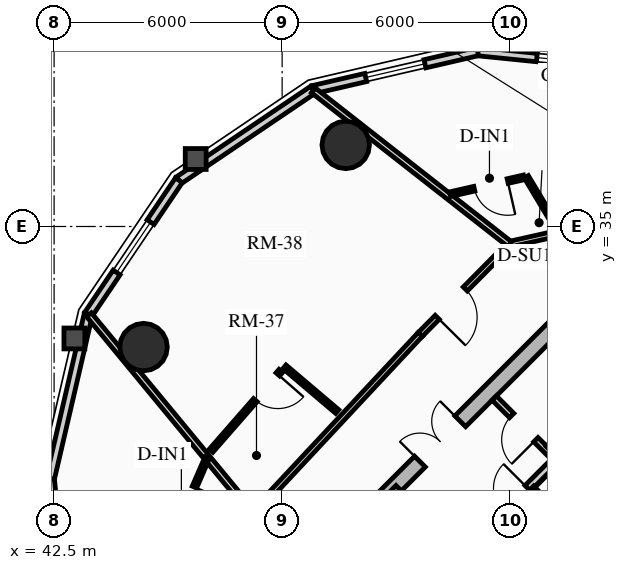
"""IFC4 building model, lengths in metres.
Left out: names, types, materials, properties, quantities, classifications, styles, units other than length and angle.
Written with IfcOpenShell. Run it as: python <this file> out.ifc"""

import sys

from ifc_helpers import new_model, si_unit, direction, frame, frame_2d, origin, origin_2d, place, context, subcontext, project, spatial, rectangle, circle, extrude, source, transform, mapped, element, fill, save


model = new_model("IFC4")
c1 = context("Model", 3, precision=1e-05, world=origin(), true_north=direction((0.0, 1.0)))
c2 = subcontext(c1, "Body", "Model", "MODEL_VIEW")
j1 = project(units=[si_unit("LENGTHUNIT", "METRE"), si_unit("PLANEANGLEUNIT", "RADIAN")], contexts=[c1])
p1 = place(None, origin())
s1 = spatial("IfcSite", under=j1, at=p1, CompositionType="ELEMENT")
p2 = place(p1, origin())
s2 = spatial("IfcBuilding", under=s1, at=p2, CompositionType="ELEMENT")
p3 = place(p2, frame((0.0, 0.0, 183.61)))
s3 = spatial("IfcBuildingStorey", under=s2, at=p3, CompositionType="ELEMENT", Elevation=183.61)
p4 = place(p3, frame((48.873, 25.561, 0.0), z_axis=(0.0, 0.0, 1.0), x_axis=(0.707106781187, 0.707106781187, 0.0)))
e1 = element("IfcWall", 1, at=p4, inside=s3, PredefinedType="SHEAR", context=c2, shape_type="SweptSolid", body=[
    extrude(rectangle(XDim=10.7, YDim=0.4, at=frame_2d((5.35, 0.0))), origin(), (0.0, 0.0, 1.0), 2.91),
])
m1 = source(origin(), c2, "Body", "SweptSolid", [
    extrude(rectangle(XDim=1.5, YDim=2.02, at=frame_2d((0.75, 1.01))), frame((0.0, 0.21, 0.0), z_axis=(0.0, -1.0, 0.0), x_axis=(1.0, 0.0, 0.0)), (0.0, 0.0, 1.0), 0.42),
])
p5 = place(p4, frame((4.6, 0.0, 0.0)))
e2 = element("IfcOpeningElement", 2, at=p5, cuts=e1, PredefinedType="OPENING", context=c2, shape_type="MappedRepresentation", body=[
    mapped(m1, transform((0.0, 0.0, 0.0), x_axis=(1.0, 0.0, 0.0), y_axis=(0.0, 1.0, 0.0), z_axis=(0.0, 0.0, 1.0), scale=1.0)),
])
p6 = place(p3, frame((61.06, 18.373, 0.0), z_axis=(0.0, 0.0, 1.0), x_axis=(-0.707106781187, 0.707106781187, 0.0)))
e3 = element("IfcWall", 3, at=p6, inside=s3, PredefinedType="SHEAR", context=c2, shape_type="SweptSolid", body=[
    extrude(rectangle(XDim=13.7, YDim=0.35, at=frame_2d((6.85, 0.0))), origin(), (0.0, 0.0, 1.0), 2.91),
])
m2 = source(origin(), c2, "Body", "SweptSolid", [
    extrude(rectangle(XDim=1.1, YDim=2.015, at=frame_2d((0.55, 1.007))), frame((0.0, 0.185, 0.0), z_axis=(0.0, -1.0, 0.0), x_axis=(1.0, 0.0, 0.0)), (0.0, 0.0, 1.0), 0.37),
])
p7 = place(p6, frame((4.85, 0.0, 0.0)))
e4 = element("IfcOpeningElement", 4, at=p7, cuts=e3, PredefinedType="OPENING", context=c2, shape_type="MappedRepresentation", body=[
    mapped(m2, transform((0.0, 0.0, 0.0), x_axis=(1.0, 0.0, 0.0), y_axis=(0.0, 1.0, 0.0), z_axis=(0.0, 0.0, 1.0), scale=1.0)),
])
p8 = place(p6, frame((0.625, 0.0, 0.0)))
e5 = element("IfcOpeningElement", 5, at=p8, cuts=e3, PredefinedType="OPENING", context=c2, shape_type="MappedRepresentation", body=[
    mapped(m2, transform((0.0, 0.0, 0.0), x_axis=(1.0, 0.0, 0.0), y_axis=(0.0, 1.0, 0.0), z_axis=(0.0, 0.0, 1.0), scale=1.0)),
])
p9 = place(p6, frame((2.625, 0.0, 0.0)))
e6 = element("IfcOpeningElement", 6, at=p9, cuts=e3, PredefinedType="OPENING", context=c2, shape_type="MappedRepresentation", body=[
    mapped(m2, transform((0.0, 0.0, 0.0), x_axis=(1.0, 0.0, 0.0), y_axis=(0.0, 1.0, 0.0), z_axis=(0.0, 0.0, 1.0), scale=1.0)),
])
m3 = source(origin(), c2, "Body", "SweptSolid", [
    extrude(rectangle(XDim=1.15, YDim=2.02, at=frame_2d((0.575, 1.01))), frame((0.0, 0.185, 0.0), z_axis=(0.0, -1.0, 0.0), x_axis=(1.0, 0.0, 0.0)), (0.0, 0.0, 1.0), 0.37),
])
p10 = place(p6, frame((7.27, 0.0, 0.0)))
e7 = element("IfcOpeningElement", 7, at=p10, cuts=e3, PredefinedType="OPENING", context=c2, shape_type="MappedRepresentation", body=[
    mapped(m3, transform((0.0, 0.0, 0.0), x_axis=(1.0, 0.0, 0.0), y_axis=(0.0, 1.0, 0.0), z_axis=(0.0, 0.0, 1.0), scale=1.0)),
])
for number, where, z_axis, x_axis in (
    (8, (50.173, 37.146, 0.0), (0.0, 0.0, 1.0), (1.0, 0.0, 0.0)),
    (9, (44.854, 31.827, 0.0), (0.0, 0.0, 1.0), (1.0, 0.0, 0.0)),
):
    element("IfcColumn", number, at=place(p3, frame(where, z_axis=z_axis, x_axis=x_axis)), inside=s3, PredefinedType="USERDEFINED", context=c2, shape_type="SweptSolid", body=[
        extrude(circle(Radius=0.625, at=origin_2d()), origin(), (0.0, 0.0, 1.0), 2.91),
    ])
p11 = place(p3, frame((53.645, 39.603, 0.0), z_axis=(0.0, 0.0, 1.0), x_axis=(0.994943283129, -0.100438356004, 0.0)))
e10 = element("IfcWall", 10, at=p11, inside=s3, PredefinedType="SOLIDWALL", context=c2, shape_type="SweptSolid", body=[
    extrude(rectangle(XDim=4.733, YDim=0.22, at=frame_2d((2.366, 0.0))), origin(), (0.0, 0.0, 1.0), 2.245),
])
m4 = source(origin(), c2, "Body", "SweptSolid", [
    extrude(rectangle(XDim=1.6, YDim=1.3, at=frame_2d((0.8, 0.65))), frame((0.0, 0.12, 0.0), z_axis=(0.0, -1.0, 0.0), x_axis=(1.0, 0.0, 0.0)), (0.0, 0.0, 1.0), 0.24),
])
p12 = place(p11, frame((1.566, 0.0, 0.65)))
e11 = element("IfcOpeningElement", 11, at=p12, cuts=e10, PredefinedType="OPENING", context=c2, shape_type="MappedRepresentation", body=[
    mapped(m4, transform((0.0, 0.0, 0.0), x_axis=(1.0, 0.0, 0.0), y_axis=(0.0, 1.0, 0.0), z_axis=(0.0, 0.0, 1.0), scale=1.0)),
])
p13 = place(p3, frame((49.313, 38.6, 0.0), z_axis=(0.0, 0.0, 1.0), x_axis=(0.97422620202, 0.22557328587, 0.0)))
e12 = element("IfcWall", 12, at=p13, inside=s3, PredefinedType="SOLIDWALL", context=c2, shape_type="SweptSolid", body=[
    extrude(rectangle(XDim=4.446, YDim=0.22, at=frame_2d((2.223, 0.0))), origin(), (0.0, 0.0, 1.0), 2.245),
])
p14 = place(p13, frame((1.423, 0.0, 0.65)))
e13 = element("IfcOpeningElement", 13, at=p14, cuts=e12, PredefinedType="OPENING", context=c2, shape_type="MappedRepresentation", body=[
    mapped(m4, transform((0.0, 0.0, 0.0), x_axis=(1.0, 0.0, 0.0), y_axis=(0.0, 1.0, 0.0), z_axis=(0.0, 0.0, 1.0), scale=1.0)),
])
p15 = place(p3, frame((45.783, 36.217, 0.0), z_axis=(0.0, 0.0, 1.0), x_axis=(0.828817439852, 0.55951912514, 0.0)))
e14 = element("IfcWall", 14, at=p15, inside=s3, PredefinedType="SOLIDWALL", context=c2, shape_type="SweptSolid", body=[
    extrude(rectangle(XDim=4.259, YDim=0.22, at=frame_2d((2.129, 0.0))), origin(), (0.0, 0.0, 1.0), 2.245),
])
p16 = place(p3, frame((43.4, 32.687, 0.0), z_axis=(0.0, 0.0, 1.0), x_axis=(0.55951912514, 0.828817439852, 0.0)))
e15 = element("IfcWall", 15, at=p16, inside=s3, PredefinedType="SOLIDWALL", context=c2, shape_type="SweptSolid", body=[
    extrude(rectangle(XDim=4.259, YDim=0.22, at=frame_2d((2.129, 0.0))), origin(), (0.0, 0.0, 1.0), 2.245),
])
p17 = place(p16, frame((1.33, 0.0, 0.65)))
e16 = element("IfcOpeningElement", 16, at=p17, cuts=e15, PredefinedType="OPENING", context=c2, shape_type="MappedRepresentation", body=[
    mapped(m4, transform((0.0, 0.0, 0.0), x_axis=(1.0, 0.0, 0.0), y_axis=(0.0, 1.0, 0.0), z_axis=(0.0, 0.0, 1.0), scale=1.0)),
])
p18 = place(p3, frame((42.397, 28.355, 0.0), z_axis=(0.0, 0.0, 1.0), x_axis=(0.22557328587, 0.97422620202, 0.0)))
e17 = element("IfcWall", 17, at=p18, inside=s3, PredefinedType="SOLIDWALL", context=c2, shape_type="SweptSolid", body=[
    extrude(rectangle(XDim=4.446, YDim=0.22, at=frame_2d((2.223, 0.0))), origin(), (0.0, 0.0, 1.0), 2.245),
])
p19 = place(p3, frame((42.873, 23.646, 0.0), z_axis=(0.0, 0.0, 1.0), x_axis=(-0.100438356004, 0.994943283129, 0.0)))
e18 = element("IfcWall", 18, at=p19, inside=s3, PredefinedType="SOLIDWALL", context=c2, shape_type="SweptSolid", body=[
    extrude(rectangle(XDim=4.733, YDim=0.22, at=frame_2d((2.366, 0.0))), origin(), (0.0, 0.0, 1.0), 2.245),
])
p20 = place(p19, frame((1.566, 0.0, 0.65)))
e19 = element("IfcOpeningElement", 19, at=p20, cuts=e18, PredefinedType="OPENING", context=c2, shape_type="MappedRepresentation", body=[
    mapped(m4, transform((0.0, 0.0, 0.0), x_axis=(1.0, 0.0, 0.0), y_axis=(0.0, 1.0, 0.0), z_axis=(0.0, 0.0, 1.0), scale=1.0)),
])
p21 = place(p3, frame((53.264, 26.416, 0.0), z_axis=(0.0, 0.0, 1.0), x_axis=(0.707106781187, 0.707106781187, 0.0)))
e20 = element("IfcWall", 20, at=p21, inside=s3, PredefinedType="PARTITIONING", context=c2, shape_type="SweptSolid", body=[
    extrude(rectangle(XDim=3.28, YDim=0.2, at=frame_2d((1.64, 0.0))), origin(), (0.0, 0.0, 1.0), 2.675),
])
m5 = source(origin(), c2, "Body", "SweptSolid", [
    extrude(rectangle(XDim=1.0, YDim=2.015, at=frame_2d((0.5, 1.007))), frame((0.0, 0.11, 0.0), z_axis=(0.0, -1.0, 0.0), x_axis=(1.0, 0.0, 0.0)), (0.0, 0.0, 1.0), 0.22),
])
p22 = place(p21, frame((0.14, 0.0, 0.0)))
e21 = element("IfcOpeningElement", 21, at=p22, cuts=e20, PredefinedType="OPENING", context=c2, shape_type="MappedRepresentation", body=[
    mapped(m5, transform((0.0, 0.0, 0.0), x_axis=(1.0, 0.0, 0.0), y_axis=(0.0, 1.0, 0.0), z_axis=(0.0, 0.0, 1.0), scale=1.0)),
])
m6 = source(origin(), c2, "Body", "SweptSolid", [
    extrude(rectangle(XDim=0.9, YDim=2.005, at=frame_2d((0.45, 1.002))), frame((0.0, 0.11, 0.0), z_axis=(0.0, -1.0, 0.0), x_axis=(1.0, 0.0, 0.0)), (0.0, 0.0, 1.0), 0.22),
])
p23 = place(p21, frame((1.5, 0.0, 0.0)))
e22 = element("IfcOpeningElement", 22, at=p23, cuts=e20, PredefinedType="OPENING", context=c2, shape_type="MappedRepresentation", body=[
    mapped(m6, transform((0.0, 0.0, 0.0), x_axis=(1.0, 0.0, 0.0), y_axis=(0.0, 1.0, 0.0), z_axis=(0.0, 0.0, 1.0), scale=1.0)),
])
p24 = place(p3, frame((56.673, 26.529, 0.0), z_axis=(0.0, 0.0, 1.0), x_axis=(-0.707052764397, 0.70716079385, 0.0)))
e23 = element("IfcWall", 23, at=p24, inside=s3, PredefinedType="PARTITIONING", context=c2, shape_type="SweptSolid", body=[
    extrude(rectangle(XDim=2.26, YDim=0.125, at=frame_2d((1.13, 0.0))), origin(), (0.0, 0.0, 1.0), 2.675),
])
m7 = source(origin(), c2, "Body", "SweptSolid", [
    extrude(rectangle(XDim=0.9, YDim=2.005, at=frame_2d((0.45, 1.002))), frame((0.0, 0.073, 0.0), z_axis=(0.0, -1.0, 0.0), x_axis=(1.0, 0.0, 0.0)), (0.0, 0.0, 1.0), 0.145),
])
p25 = place(p24, frame((0.65, 0.0, 0.0)))
e24 = element("IfcOpeningElement", 24, at=p25, cuts=e23, PredefinedType="OPENING", context=c2, shape_type="MappedRepresentation", body=[
    mapped(m7, transform((0.0, 0.0, 0.0), x_axis=(1.0, 0.0, 0.0), y_axis=(0.0, 1.0, 0.0), z_axis=(0.0, 0.0, 1.0), scale=1.0)),
])
p26 = place(p3, frame((56.839, 27.728, 0.0), z_axis=(0.0, 0.0, 1.0), x_axis=(-0.707106781187, 0.707106781187, 0.0)))
e25 = element("IfcWall", 25, at=p26, inside=s3, PredefinedType="PARTITIONING", context=c2, shape_type="SweptSolid", body=[
    extrude(rectangle(XDim=3.9, YDim=0.16, at=frame_2d((1.95, 0.0))), origin(), (0.0, 0.0, 1.0), 2.675),
])
m8 = source(origin(), c2, "Body", "SweptSolid", [
    extrude(rectangle(XDim=0.9, YDim=2.005, at=frame_2d((0.45, 1.002))), frame((0.0, 0.09, 0.0), z_axis=(0.0, -1.0, 0.0), x_axis=(1.0, 0.0, 0.0)), (0.0, 0.0, 1.0), 0.18),
])
p27 = place(p26, frame((0.55, 0.0, 0.0)))
e26 = element("IfcOpeningElement", 26, at=p27, cuts=e25, PredefinedType="OPENING", context=c2, shape_type="MappedRepresentation", body=[
    mapped(m8, transform((0.0, 0.0, 0.0), x_axis=(1.0, 0.0, 0.0), y_axis=(0.0, 1.0, 0.0), z_axis=(0.0, 0.0, 1.0), scale=1.0)),
])
p28 = place(p26, frame((2.35, 0.0, 0.0)))
e27 = element("IfcOpeningElement", 27, at=p28, cuts=e25, PredefinedType="OPENING", context=c2, shape_type="MappedRepresentation", body=[
    mapped(m8, transform((0.0, 0.0, 0.0), x_axis=(1.0, 0.0, 0.0), y_axis=(0.0, 1.0, 0.0), z_axis=(0.0, 0.0, 1.0), scale=1.0)),
])
p29 = place(p3, frame((55.492, 29.167, 0.0), z_axis=(0.0, 0.0, 1.0), x_axis=(0.707144688645, 0.707068871696, 0.0)))
e28 = element("IfcWall", 28, at=p29, inside=s3, PredefinedType="PARTITIONING", context=c2, shape_type="SweptSolid", body=[
    extrude(rectangle(XDim=3.22, YDim=0.125, at=frame_2d((1.61, 0.0))), origin(), (0.0, 0.0, 1.0), 2.212),
])
p30 = place(p3, frame((56.025, 34.88, 0.0), z_axis=(0.0, 0.0, 1.0), x_axis=(-0.975729093394, -0.218981132301, 0.0)))
e29 = element("IfcWall", 29, at=p30, inside=s3, PredefinedType="PARTITIONING", context=c2, shape_type="SweptSolid", body=[
    extrude(rectangle(XDim=1.575, YDim=0.15, at=frame_2d((0.788, 0.0))), origin(), (0.0, 0.0, 1.0), 2.245),
])
p31 = place(p3, frame((54.488, 34.535, 0.0), z_axis=(0.0, 0.0, 1.0), x_axis=(-0.703666289339, -0.710530613871, 0.0)))
e30 = element("IfcWall", 30, at=p31, inside=s3, PredefinedType="PARTITIONING", context=c2, shape_type="SweptSolid", body=[
    extrude(rectangle(XDim=3.343, YDim=0.15, at=frame_2d((1.672, 0.0))), origin(), (0.0, 0.0, 1.0), 2.245),
])
m9 = source(origin(), c2, "Body", "SweptSolid", [
    extrude(rectangle(XDim=1.05, YDim=2.015, at=frame_2d((0.525, 1.007))), frame((0.0, 0.085, 0.0), z_axis=(0.0, -1.0, 0.0), x_axis=(1.0, 0.0, 0.0)), (0.0, 0.0, 1.0), 0.17),
])
p32 = place(p31, frame((1.66, 0.0, 0.0)))
e31 = element("IfcOpeningElement", 31, at=p32, cuts=e30, PredefinedType="OPENING", context=c2, shape_type="MappedRepresentation", body=[
    mapped(m9, transform((0.0, 0.0, 0.0), x_axis=(1.0, 0.0, 0.0), y_axis=(0.0, 1.0, 0.0), z_axis=(0.0, 0.0, 1.0), scale=1.0)),
])
p33 = place(p3, frame((52.135, 32.159, 0.0), z_axis=(0.0, 0.0, 1.0), x_axis=(-0.682546302454, -0.730842353047, 0.0)))
e32 = element("IfcWall", 32, at=p33, inside=s3, PredefinedType="PARTITIONING", context=c2, shape_type="SweptSolid", body=[
    extrude(rectangle(XDim=6.445, YDim=0.15, at=frame_2d((3.223, 0.0))), origin(), (0.0, 0.0, 1.0), 2.245),
])
p34 = place(p3, frame((54.488, 34.535, 0.0), z_axis=(0.0, 0.0, 1.0), x_axis=(-0.787155500995, 0.616754584298, 0.0)))
e33 = element("IfcWall", 33, at=p34, inside=s3, PredefinedType="PARTITIONING", context=c2, shape_type="SweptSolid", body=[
    extrude(rectangle(XDim=6.562, YDim=0.16, at=frame_2d((3.281, 0.0))), origin(), (0.0, 0.0, 1.0), 2.245),
])
p35 = place(p3, frame((47.736, 27.449, 0.0), z_axis=(0.0, 0.0, 1.0), x_axis=(-0.636785609289, 0.771040911886, 0.0)))
e34 = element("IfcWall", 34, at=p35, inside=s3, PredefinedType="PARTITIONING", context=c2, shape_type="SweptSolid", body=[
    extrude(rectangle(XDim=6.781, YDim=0.16, at=frame_2d((3.391, 0.0))), origin(), (0.0, 0.0, 1.0), 2.245),
])
p36 = place(p3, frame((55.727, 34.97, 0.0), z_axis=(0.0, 0.0, 1.0), x_axis=(-0.514518774568, 0.857479113808, 0.0)))
e35 = element("IfcWall", 35, at=p36, inside=s3, PredefinedType="PARTITIONING", context=c2, shape_type="SweptSolid", body=[
    extrude(rectangle(XDim=1.56, YDim=0.125, at=frame_2d((0.78, 0.0))), origin(), (0.0, 0.0, 1.0), 2.245),
])
p37 = place(p3, frame((54.864, 36.293, 0.0), z_axis=(0.0, 0.0, 1.0), x_axis=(-0.974875983782, -0.222748324896, 0.0)))
e36 = element("IfcWall", 36, at=p37, inside=s3, PredefinedType="PARTITIONING", context=c2, shape_type="SweptSolid", body=[
    extrude(rectangle(XDim=1.994, YDim=0.125, at=frame_2d((0.997, 0.0))), origin(), (0.0, 0.0, 1.0), 2.675),
])
p38 = place(p37, frame((0.44, 0.0, 0.0)))
e37 = element("IfcOpeningElement", 37, at=p38, cuts=e36, PredefinedType="OPENING", context=c2, shape_type="MappedRepresentation", body=[
    mapped(m7, transform((0.0, 0.0, 0.0), x_axis=(1.0, 0.0, 0.0), y_axis=(0.0, 1.0, 0.0), z_axis=(0.0, 0.0, 1.0), scale=1.0)),
])
p39 = place(p3, frame((49.949, 30.13, 0.0), z_axis=(0.0, 0.0, 1.0), x_axis=(-0.76253118385, 0.646951461592, 0.0)))
e38 = element("IfcWall", 38, at=p39, inside=s3, PredefinedType="PARTITIONING", context=c2, shape_type="SweptSolid", body=[
    extrude(rectangle(XDim=1.821, YDim=0.125, at=frame_2d((0.91, 0.0))), origin(), (0.0, 0.0, 1.0), 2.675),
])
p40 = place(p3, frame((48.465, 31.199, 0.0), z_axis=(0.0, 0.0, 1.0), x_axis=(-0.658113718436, -0.752918543805, 0.0)))
e39 = element("IfcWall", 39, at=p40, inside=s3, PredefinedType="PARTITIONING", context=c2, shape_type="SweptSolid", body=[
    extrude(rectangle(XDim=2.786, YDim=0.125, at=frame_2d((1.393, 0.0))), origin(), (0.0, 0.0, 1.0), 2.245),
])
p41 = place(p40, frame((0.12, 0.0, 0.0)))
e40 = element("IfcOpeningElement", 40, at=p41, cuts=e39, PredefinedType="OPENING", context=c2, shape_type="MappedRepresentation", body=[
    mapped(m7, transform((0.0, 0.0, 0.0), x_axis=(1.0, 0.0, 0.0), y_axis=(0.0, 1.0, 0.0), z_axis=(0.0, 0.0, 1.0), scale=1.0)),
])
p42 = place(p3, frame((46.527, 28.913, 0.0), z_axis=(0.0, 0.0, 1.0), x_axis=(-0.398002989165, -0.917384118358, 0.0)))
e41 = element("IfcWall", 41, at=p42, inside=s3, PredefinedType="PARTITIONING", context=c2, shape_type="SweptSolid", body=[
    extrude(rectangle(XDim=2.581, YDim=0.125, at=frame_2d((1.29, 0.0))), origin(), (0.0, 0.0, 1.0), 2.245),
])
p43 = place(p42, frame((0.84, 0.0, 0.0)))
e42 = element("IfcOpeningElement", 42, at=p43, cuts=e41, PredefinedType="OPENING", context=c2, shape_type="MappedRepresentation", body=[
    mapped(m7, transform((0.0, 0.0, 0.0), x_axis=(1.0, 0.0, 0.0), y_axis=(0.0, 1.0, 0.0), z_axis=(0.0, 0.0, 1.0), scale=1.0)),
])
m10 = source(origin(), c2, "Body", "SweptSolid", [
    extrude(rectangle(XDim=1.6, YDim=1.3, at=frame_2d((0.8, 0.65))), frame((0.0, 0.03, 0.0), z_axis=(0.0, -1.0, 0.0), x_axis=(1.0, 0.0, 0.0)), (0.0, 0.0, 1.0), 0.06),
])
p44 = place(p12, origin())
e43 = element("IfcWindow", 43, at=p44, inside=s3, PartitioningType="SINGLE_PANEL", PredefinedType="WINDOW", context=c2, shape_type="MappedRepresentation", body=[
    mapped(m10, transform((0.0, 0.0, 0.0), x_axis=(1.0, 0.0, 0.0), y_axis=(0.0, 1.0, 0.0), z_axis=(0.0, 0.0, 1.0), scale=1.0)),
])
fill(e11, e43)
p45 = place(p14, origin())
e44 = element("IfcWindow", 44, at=p45, inside=s3, PartitioningType="SINGLE_PANEL", PredefinedType="WINDOW", context=c2, shape_type="MappedRepresentation", body=[
    mapped(m10, transform((0.0, 0.0, 0.0), x_axis=(1.0, 0.0, 0.0), y_axis=(0.0, 1.0, 0.0), z_axis=(0.0, 0.0, 1.0), scale=1.0)),
])
fill(e13, e44)
p46 = place(p17, origin())
e45 = element("IfcWindow", 45, at=p46, inside=s3, PartitioningType="SINGLE_PANEL", PredefinedType="WINDOW", context=c2, shape_type="MappedRepresentation", body=[
    mapped(m10, transform((0.0, 0.0, 0.0), x_axis=(1.0, 0.0, 0.0), y_axis=(0.0, 1.0, 0.0), z_axis=(0.0, 0.0, 1.0), scale=1.0)),
])
fill(e16, e45)
m11 = source(origin(), c2, "Body", "SweptSolid", [
    extrude(rectangle(XDim=1.5, YDim=2.02, at=frame_2d((0.75, 1.01))), frame((0.0, 0.025, 0.0), z_axis=(0.0, -1.0, 0.0), x_axis=(1.0, 0.0, 0.0)), (0.0, 0.0, 1.0), 0.05),
])
p47 = place(p5, origin())
e46 = element("IfcDoor", 46, at=p47, inside=s3, OperationType="DOUBLE_DOOR_SINGLE_SWING", PredefinedType="DOOR", context=c2, shape_type="MappedRepresentation", body=[
    mapped(m11, transform((0.0, 0.0, 0.0), x_axis=(1.0, 0.0, 0.0), y_axis=(0.0, 1.0, 0.0), z_axis=(0.0, 0.0, 1.0), scale=1.0)),
])
fill(e2, e46)
m12 = source(origin(), c2, "Body", "SweptSolid", [
    extrude(rectangle(XDim=0.9, YDim=2.005, at=frame_2d((0.45, 1.002))), frame((0.0, 0.025, 0.0), z_axis=(0.0, -1.0, 0.0), x_axis=(1.0, 0.0, 0.0)), (0.0, 0.0, 1.0), 0.05),
])
p48 = place(p23, origin())
e47 = element("IfcDoor", 47, at=p48, inside=s3, OperationType="SINGLE_SWING_RIGHT", PredefinedType="DOOR", context=c2, shape_type="MappedRepresentation", body=[
    mapped(m12, transform((0.0, 0.0, 0.0), x_axis=(1.0, 0.0, 0.0), y_axis=(0.0, 1.0, 0.0), z_axis=(0.0, 0.0, 1.0), scale=1.0)),
])
fill(e22, e47)
p49 = place(p28, origin())
e48 = element("IfcDoor", 48, at=p49, inside=s3, OperationType="SINGLE_SWING_LEFT", PredefinedType="DOOR", context=c2, shape_type="MappedRepresentation", body=[
    mapped(m12, transform((0.0, 0.0, 0.0), x_axis=(1.0, 0.0, 0.0), y_axis=(0.0, 1.0, 0.0), z_axis=(0.0, 0.0, 1.0), scale=1.0)),
])
fill(e27, e48)
p50 = place(p38, origin())
e49 = element("IfcDoor", 49, at=p50, inside=s3, OperationType="SINGLE_SWING_LEFT", PredefinedType="DOOR", context=c2, shape_type="MappedRepresentation", body=[
    mapped(m12, transform((0.0, 0.0, 0.0), x_axis=(1.0, 0.0, 0.0), y_axis=(0.0, 1.0, 0.0), z_axis=(0.0, 0.0, 1.0), scale=1.0)),
])
fill(e37, e49)
m13 = source(origin(), c2, "Body", "SweptSolid", [
    extrude(rectangle(XDim=1.05, YDim=2.015, at=frame_2d((0.525, 1.007))), frame((0.0, 0.025, 0.0), z_axis=(0.0, -1.0, 0.0), x_axis=(1.0, 0.0, 0.0)), (0.0, 0.0, 1.0), 0.05),
])
p51 = place(p32, origin())
e50 = element("IfcDoor", 50, at=p51, inside=s3, OperationType="SINGLE_SWING_RIGHT", PredefinedType="DOOR", context=c2, shape_type="MappedRepresentation", body=[
    mapped(m13, transform((0.0, 0.0, 0.0), x_axis=(1.0, 0.0, 0.0), y_axis=(0.0, 1.0, 0.0), z_axis=(0.0, 0.0, 1.0), scale=1.0)),
])
fill(e31, e50)
p52 = place(p41, origin())
e51 = element("IfcDoor", 51, at=p52, inside=s3, OperationType="SINGLE_SWING_LEFT", PredefinedType="DOOR", context=c2, shape_type="MappedRepresentation", body=[
    mapped(m12, transform((0.0, 0.0, 0.0), x_axis=(1.0, 0.0, 0.0), y_axis=(0.0, 1.0, 0.0), z_axis=(0.0, 0.0, 1.0), scale=1.0)),
])
fill(e40, e51)
p53 = place(p43, origin())
e52 = element("IfcDoor", 52, at=p53, inside=s3, OperationType="SINGLE_SWING_LEFT", PredefinedType="DOOR", context=c2, shape_type="MappedRepresentation", body=[
    mapped(m12, transform((0.0, 0.0, 0.0), x_axis=(1.0, 0.0, 0.0), y_axis=(0.0, 1.0, 0.0), z_axis=(0.0, 0.0, 1.0), scale=1.0)),
])
fill(e42, e52)
save(model, sys.argv[1])
